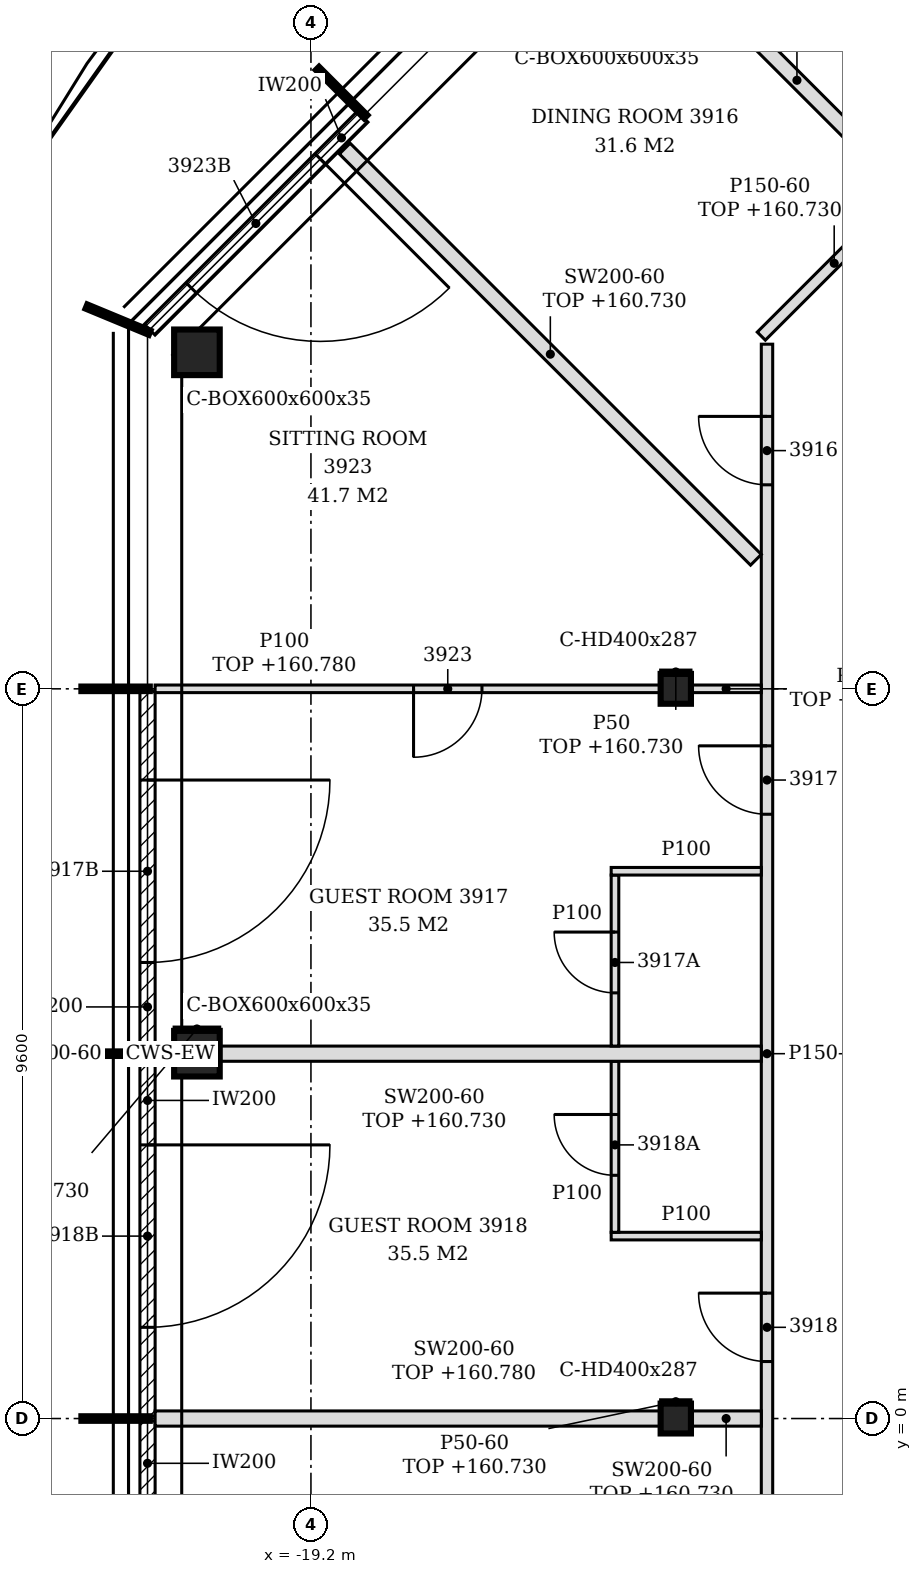
"""IFC4 building model, lengths in metres.
Left out: names, types, materials, properties, quantities, classifications, styles, units other than length and angle.
Written with IfcOpenShell. Run it as: python <this file> out.ifc"""

import sys

from ifc_helpers import new_model, si_unit, direction, frame, frame_2d, origin, origin_2d, place, context, subcontext, project, spatial, polyline, rectangle, hollow_rectangle, i_section, outline, extrude, element, fill, save


model = new_model("IFC4")
c1 = context("Model", 3, precision=1e-05, world=origin(), true_north=direction((0.0, 1.0)))
c2 = subcontext(c1, "Body", "Model", "MODEL_VIEW")
j1 = project(units=[si_unit("LENGTHUNIT", "METRE"), si_unit("PLANEANGLEUNIT", "RADIAN")], contexts=[c1])
p1 = place(None, origin())
s1 = spatial("IfcSite", under=j1, at=p1, CompositionType="ELEMENT")
p2 = place(p1, origin())
s2 = spatial("IfcBuilding", under=s1, at=p2, CompositionType="ELEMENT")
p3 = place(p2, frame((0.0, 0.0, 157.8)))
s3 = spatial("IfcBuildingStorey", under=s2, at=p3, CompositionType="ELEMENT", Elevation=157.8)
for number, where, z_axis, x_axis in (
    (1, (-20.7, 14.027, -0.15), (0.0, 0.0, 1.0), (1.0, 0.0, 0.0)),
    (2, (-20.7, 4.8, -0.15), (0.0, 0.0, 1.0), (1.0, 0.0, 0.0)),
):
    element("IfcColumn", number, at=place(p3, frame(where, z_axis=z_axis, x_axis=x_axis)), inside=s3, PredefinedType="COLUMN", context=c2, shape_type="SweptSolid", body=[
        extrude(hollow_rectangle(XDim=0.6, YDim=0.6, WallThickness=0.035, at=origin_2d()), origin(), (0.0, 0.0, 1.0), 3.6),
    ])
for number, where, z_axis, x_axis in (
    (3, (-14.4, 0.0, -0.15), (0.0, 0.0, 1.0), (1.0, 0.0, 0.0)),
    (4, (-14.4, 9.6, -0.15), (0.0, 0.0, 1.0), (1.0, 0.0, 0.0)),
):
    element("IfcColumn", number, at=place(p3, frame(where, z_axis=z_axis, x_axis=x_axis)), inside=s3, PredefinedType="COLUMN", context=c2, shape_type="SweptSolid", body=[
        extrude(i_section(OverallWidth=0.399, OverallDepth=0.393, WebThickness=0.023, FlangeThickness=0.037, FilletRadius=0.015, at=origin_2d()), origin(), (0.0, 0.0, 1.0), 3.6),
    ])
p4 = place(p3, frame((-18.521, 17.126, 0.0), z_axis=(0.0, 0.0, 1.0), x_axis=(-0.707106781187, -0.707106781187, 0.0)))
e5 = element("IfcWall", 5, at=p4, inside=s3, PredefinedType="NOTDEFINED", context=c2, shape_type="SweptSolid", body=[
    extrude(rectangle(XDim=3.962, YDim=0.2, at=frame_2d((1.981, 0.0))), origin(), (0.0, 0.0, 1.0), 3.45),
])
p5 = place(p4, frame((0.785, 0.0, 0.0)))
e6 = element("IfcOpeningElement", 6, at=p5, cuts=e5, PredefinedType="OPENING", context=c2, shape_type="SweptSolid", body=[
    extrude(rectangle(XDim=2.4, YDim=2.4, at=frame_2d((1.2, 1.2))), frame((0.0, 0.11, 0.0), z_axis=(0.0, -1.0, 0.0), x_axis=(1.0, 0.0, 0.0)), (0.0, 0.0, 1.0), 0.22),
])
p6 = place(p3, frame((-21.35, 9.57, 0.0), z_axis=(0.0, 0.0, 1.0), x_axis=(0.0, -1.0, 0.0)))
e7 = element("IfcWall", 7, at=p6, inside=s3, PredefinedType="NOTDEFINED", context=c2, shape_type="SweptSolid", body=[
    extrude(rectangle(XDim=4.74, YDim=0.2, at=frame_2d((2.37, 0.0))), origin(), (0.0, 0.0, 1.0), 3.45),
])
p7 = place(p6, frame((1.17, 0.0, 0.0)))
e8 = element("IfcOpeningElement", 8, at=p7, cuts=e7, PredefinedType="OPENING", context=c2, shape_type="SweptSolid", body=[
    extrude(rectangle(XDim=2.4, YDim=2.4, at=frame_2d((1.2, 1.2))), frame((0.0, 0.11, 0.0), z_axis=(0.0, -1.0, 0.0), x_axis=(1.0, 0.0, 0.0)), (0.0, 0.0, 1.0), 0.22),
])
p8 = place(p3, frame((-21.35, 4.77, 0.0), z_axis=(0.0, 0.0, 1.0), x_axis=(0.0, -1.0, 0.0)))
e9 = element("IfcWall", 9, at=p8, inside=s3, PredefinedType="NOTDEFINED", context=c2, shape_type="SweptSolid", body=[
    extrude(rectangle(XDim=4.74, YDim=0.2, at=frame_2d((2.37, 0.0))), origin(), (0.0, 0.0, 1.0), 3.45),
])
p9 = place(p8, frame((1.17, 0.0, 0.0)))
e10 = element("IfcOpeningElement", 10, at=p9, cuts=e9, PredefinedType="OPENING", context=c2, shape_type="SweptSolid", body=[
    extrude(rectangle(XDim=2.4, YDim=2.4, at=frame_2d((1.2, 1.2))), frame((0.0, 0.11, 0.0), z_axis=(0.0, -1.0, 0.0), x_axis=(1.0, 0.0, 0.0)), (0.0, 0.0, 1.0), 0.22),
])
p10 = place(p3, frame((-21.35, -0.03, 0.0), z_axis=(0.0, 0.0, 1.0), x_axis=(0.0, -1.0, 0.0)))
e11 = element("IfcWall", 11, at=p10, inside=s3, PredefinedType="NOTDEFINED", context=c2, shape_type="SweptSolid", body=[
    extrude(rectangle(XDim=4.626, YDim=0.2, at=frame_2d((2.313, 0.0))), origin(), (0.0, 0.0, 1.0), 3.45),
])
p11 = place(p10, frame((1.118, 0.0, 0.0)))
e12 = element("IfcOpeningElement", 12, at=p11, cuts=e11, PredefinedType="OPENING", context=c2, shape_type="SweptSolid", body=[
    extrude(rectangle(XDim=2.4, YDim=2.4, at=frame_2d((1.2, 1.2))), frame((0.0, 0.11, 0.0), z_axis=(0.0, -1.0, 0.0), x_axis=(1.0, 0.0, 0.0)), (0.0, 0.0, 1.0), 0.22),
])
p12 = place(p3, frame((-13.2, -3.5, 0.0), z_axis=(0.0, 0.0, 1.0), x_axis=(0.0, 1.0, 0.0)))
e13 = element("IfcWall", 13, at=p12, inside=s3, PredefinedType="PARTITIONING", context=c2, shape_type="SweptSolid", body=[
    extrude(outline(polyline([(0.0, 0.0), (17.634, 0.0), (17.634, 3.45), (13.2, 3.45), (13.198, 2.93), (13.0, 2.93), (12.998, 3.45), (8.4, 3.45), (8.398, 2.93), (8.2, 2.93), (8.198, 3.45), (3.6, 3.45), (3.598, 2.93), (3.4, 2.93), (3.398, 3.45), (0.0, 3.45), (0.0, 0.0)])), frame((0.0, 0.075, 0.0), z_axis=(0.0, -1.0, 0.0), x_axis=(1.0, 0.0, 0.0)), (0.0, 0.0, 1.0), 0.15),
])
p13 = place(p12, frame((15.784, 0.0, 0.0)))
e14 = element("IfcOpeningElement", 14, at=p13, cuts=e13, PredefinedType="OPENING", context=c2, shape_type="SweptSolid", body=[
    extrude(rectangle(XDim=0.9, YDim=2.1, at=frame_2d((0.45, 1.05))), frame((0.0, 0.085, 0.0), z_axis=(0.0, -1.0, 0.0), x_axis=(1.0, 0.0, 0.0)), (0.0, 0.0, 1.0), 0.17),
])
p14 = place(p12, frame((11.45, 0.0, 0.0)))
e15 = element("IfcOpeningElement", 15, at=p14, cuts=e13, PredefinedType="OPENING", context=c2, shape_type="SweptSolid", body=[
    extrude(rectangle(XDim=0.9, YDim=2.1, at=frame_2d((0.45, 1.05))), frame((0.0, 0.085, 0.0), z_axis=(0.0, -1.0, 0.0), x_axis=(1.0, 0.0, 0.0)), (0.0, 0.0, 1.0), 0.17),
])
p15 = place(p12, frame((4.25, 0.0, 0.0)))
e16 = element("IfcOpeningElement", 16, at=p15, cuts=e13, PredefinedType="OPENING", context=c2, shape_type="SweptSolid", body=[
    extrude(rectangle(XDim=0.9, YDim=2.1, at=frame_2d((0.45, 1.05))), frame((0.0, 0.085, 0.0), z_axis=(0.0, -1.0, 0.0), x_axis=(1.0, 0.0, 0.0)), (0.0, 0.0, 1.0), 0.17),
])
p16 = place(p12, frame((1.353, 0.0, 0.0)))
e17 = element("IfcOpeningElement", 17, at=p16, cuts=e13, PredefinedType="OPENING", context=c2, shape_type="SweptSolid", body=[
    extrude(rectangle(XDim=0.9, YDim=2.1, at=frame_2d((0.45, 1.05))), frame((0.0, 0.085, 0.0), z_axis=(0.0, -1.0, 0.0), x_axis=(1.0, 0.0, 0.0)), (0.0, 0.0, 1.0), 0.17),
])
p17 = place(p3, frame((-21.25, 0.0, 0.0), z_axis=(0.0, 0.0, 1.0), x_axis=(1.0, 0.0, 0.0)))
e18 = element("IfcWall", 18, at=p17, inside=s3, PredefinedType="PARTITIONING", context=c2, shape_type="SweptSolid", body=[
    extrude(outline(polyline([(0.0, 0.0), (6.65, 0.0), (6.65, 2.98), (0.7, 2.98), (0.698, 2.93), (0.4, 2.93), (0.398, 2.98), (0.0, 2.98), (0.0, 0.0)])), frame((0.0, 0.1, 0.0), z_axis=(0.0, -1.0, 0.0), x_axis=(1.0, 0.0, 0.0)), (0.0, 0.0, 1.0), 0.2),
])
p18 = place(p3, frame((-14.2, 0.0, 0.0), z_axis=(0.0, 0.0, 1.0), x_axis=(1.0, 0.0, 0.0)))
e19 = element("IfcWall", 19, at=p18, inside=s3, PredefinedType="PARTITIONING", context=c2, shape_type="SweptSolid", body=[
    extrude(rectangle(XDim=0.926, YDim=0.2, at=frame_2d((0.463, 0.0))), origin(), (0.0, 0.0, 1.0), 2.93),
])
p19 = place(p3, frame((-15.25, 2.4, 0.0), z_axis=(0.0, 0.0, 1.0), x_axis=(1.0, 0.0, 0.0)))
e20 = element("IfcWall", 20, at=p19, inside=s3, PredefinedType="PARTITIONING", context=c2, shape_type="SweptSolid", body=[
    extrude(outline(polyline([(0.0, 0.0), (1.975, 0.0), (1.975, 3.45), (1.0, 3.45), (0.998, 2.93), (0.7, 2.93), (0.698, 3.45), (0.0, 3.45), (0.0, 0.0)])), frame((0.0, 0.05, 0.0), z_axis=(0.0, -1.0, 0.0), x_axis=(1.0, 0.0, 0.0)), (0.0, 0.0, 1.0), 0.1),
])
p20 = place(p3, frame((-15.2, 2.45, 0.0), z_axis=(0.0, 0.0, 1.0), x_axis=(0.0, 1.0, 0.0)))
e21 = element("IfcWall", 21, at=p20, inside=s3, PredefinedType="PARTITIONING", context=c2, shape_type="SweptSolid", body=[
    extrude(rectangle(XDim=2.25, YDim=0.1, at=frame_2d((1.125, 0.0))), origin(), (0.0, 0.0, 1.0), 3.45),
])
p21 = place(p20, frame((0.75, 0.0, 0.0)))
e22 = element("IfcOpeningElement", 22, at=p21, cuts=e21, PredefinedType="OPENING", context=c2, shape_type="SweptSolid", body=[
    extrude(rectangle(XDim=0.8, YDim=2.1, at=frame_2d((0.4, 1.05))), frame((0.0, 0.06, 0.0), z_axis=(0.0, -1.0, 0.0), x_axis=(1.0, 0.0, 0.0)), (0.0, 0.0, 1.0), 0.12),
])
p22 = place(p3, frame((-21.25, 4.8, 0.0), z_axis=(0.0, 0.0, 1.0), x_axis=(1.0, 0.0, 0.0)))
e23 = element("IfcWall", 23, at=p22, inside=s3, PredefinedType="PARTITIONING", context=c2, shape_type="SweptSolid", body=[
    extrude(rectangle(XDim=0.25, YDim=0.2, at=frame_2d((0.125, 0.0))), origin(), (0.0, 0.0, 1.0), 3.45),
])
p23 = place(p3, frame((-20.4, 4.8, 0.0), z_axis=(0.0, 0.0, 1.0), x_axis=(1.0, 0.0, 0.0)))
e24 = element("IfcWall", 24, at=p23, inside=s3, PredefinedType="PARTITIONING", context=c2, shape_type="SweptSolid", body=[
    extrude(rectangle(XDim=7.125, YDim=0.2, at=frame_2d((3.562, 0.0))), origin(), (0.0, 0.0, 1.0), 2.93),
])
p24 = place(p3, frame((-15.2, 4.9, 0.0), z_axis=(0.0, 0.0, 1.0), x_axis=(0.0, 1.0, 0.0)))
e25 = element("IfcWall", 25, at=p24, inside=s3, PredefinedType="PARTITIONING", context=c2, shape_type="SweptSolid", body=[
    extrude(rectangle(XDim=2.25, YDim=0.1, at=frame_2d((1.125, 0.0))), origin(), (0.0, 0.0, 1.0), 3.45),
])
p25 = place(p24, frame((0.7, 0.0, 0.0)))
e26 = element("IfcOpeningElement", 26, at=p25, cuts=e25, PredefinedType="OPENING", context=c2, shape_type="SweptSolid", body=[
    extrude(rectangle(XDim=0.8, YDim=2.1, at=frame_2d((0.4, 1.05))), frame((0.0, 0.06, 0.0), z_axis=(0.0, -1.0, 0.0), x_axis=(1.0, 0.0, 0.0)), (0.0, 0.0, 1.0), 0.12),
])
p26 = place(p3, frame((-15.25, 7.2, 0.0), z_axis=(0.0, 0.0, 1.0), x_axis=(1.0, 0.0, 0.0)))
e27 = element("IfcWall", 27, at=p26, inside=s3, PredefinedType="PARTITIONING", context=c2, shape_type="SweptSolid", body=[
    extrude(outline(polyline([(0.0, 0.0), (1.975, 0.0), (1.975, 3.45), (1.0, 3.45), (0.998, 2.93), (0.7, 2.93), (0.698, 3.45), (0.0, 3.45), (0.0, 0.0)])), frame((0.0, 0.05, 0.0), z_axis=(0.0, -1.0, 0.0), x_axis=(1.0, 0.0, 0.0)), (0.0, 0.0, 1.0), 0.1),
])
p27 = place(p3, frame((-21.25, 9.6, 0.0), z_axis=(0.0, 0.0, 1.0), x_axis=(1.0, 0.0, 0.0)))
e28 = element("IfcWall", 28, at=p27, inside=s3, PredefinedType="PARTITIONING", context=c2, shape_type="SweptSolid", body=[
    extrude(outline(polyline([(0.0, 0.0), (6.65, 0.0), (6.65, 2.98), (0.7, 2.98), (0.698, 2.93), (0.4, 2.93), (0.398, 2.98), (0.0, 2.98), (0.0, 0.0)])), frame((0.0, 0.05, 0.0), z_axis=(0.0, -1.0, 0.0), x_axis=(1.0, 0.0, 0.0)), (0.0, 0.0, 1.0), 0.1),
])
p28 = place(p27, frame((3.4, 0.0, 0.0)))
e29 = element("IfcOpeningElement", 29, at=p28, cuts=e28, PredefinedType="OPENING", context=c2, shape_type="SweptSolid", body=[
    extrude(rectangle(XDim=0.9, YDim=2.1, at=frame_2d((0.45, 1.05))), frame((0.0, 0.06, 0.0), z_axis=(0.0, -1.0, 0.0), x_axis=(1.0, 0.0, 0.0)), (0.0, 0.0, 1.0), 0.12),
])
p29 = place(p3, frame((-14.2, 9.6, 0.0), z_axis=(0.0, 0.0, 1.0), x_axis=(1.0, 0.0, 0.0)))
e30 = element("IfcWall", 30, at=p29, inside=s3, PredefinedType="PARTITIONING", context=c2, shape_type="SweptSolid", body=[
    extrude(rectangle(XDim=0.926, YDim=0.1, at=frame_2d((0.463, 0.0))), origin(), (0.0, 0.0, 1.0), 2.93),
])
p30 = place(p3, frame((-13.346, 11.298, 0.0), z_axis=(0.0, 0.0, 1.0), x_axis=(-0.707106781187, 0.707106781187, 0.0)))
e31 = element("IfcWall", 31, at=p30, inside=s3, PredefinedType="PARTITIONING", context=c2, shape_type="SweptSolid", body=[
    extrude(rectangle(XDim=7.65, YDim=0.2, at=frame_2d((3.825, 0.0))), origin(), (0.0, 0.0, 1.0), 2.93),
])
p31 = place(p3, frame((-13.275, 14.24, 0.0), z_axis=(0.0, 0.0, 1.0), x_axis=(0.707286821097, 0.706926695424, 0.0)))
e32 = element("IfcWall", 32, at=p31, inside=s3, PredefinedType="PARTITIONING", context=c2, shape_type="SweptSolid", body=[
    extrude(rectangle(XDim=2.712, YDim=0.15, at=frame_2d((1.356, 0.0))), origin(), (0.0, 0.0, 1.0), 2.93),
])
p32 = place(p3, frame((-11.41, 16.21, 0.0), z_axis=(0.0, 0.0, 1.0), x_axis=(-0.707106781187, 0.707106781187, 0.0)))
e33 = element("IfcWall", 33, at=p32, inside=s3, PredefinedType="PARTITIONING", context=c2, shape_type="SweptSolid", body=[
    extrude(rectangle(XDim=3.948, YDim=0.2, at=frame_2d((1.974, 0.0))), origin(), (0.0, 0.0, 1.0), 2.93),
])
p33 = place(p3, frame((-14.6, 0.221, 0.0), z_axis=(0.0, 0.0, 1.0), x_axis=(1.0, 0.0, 0.0)))
e34 = element("IfcWall", 34, at=p33, inside=s3, PredefinedType="PARTITIONING", context=c2, shape_type="SweptSolid", body=[
    extrude(rectangle(XDim=0.399, YDim=0.05, at=frame_2d((0.2, 0.0))), origin(), (0.0, 0.0, 1.0), 2.93),
])
p34 = place(p3, frame((-21.0, 5.125, 0.0), z_axis=(0.0, 0.0, 1.0), x_axis=(1.0, 0.0, 0.0)))
e35 = element("IfcWall", 35, at=p34, inside=s3, PredefinedType="PARTITIONING", context=c2, shape_type="SweptSolid", body=[
    extrude(rectangle(XDim=0.6, YDim=0.05, at=frame_2d((0.3, 0.0))), origin(), (0.0, 0.0, 1.0), 2.93),
])
p35 = place(p3, frame((-14.6, 9.822, 0.0), z_axis=(0.0, 0.0, 1.0), x_axis=(1.0, 0.0, 0.0)))
e36 = element("IfcWall", 36, at=p35, inside=s3, PredefinedType="PARTITIONING", context=c2, shape_type="SweptSolid", body=[
    extrude(rectangle(XDim=0.399, YDim=0.05, at=frame_2d((0.2, 0.0))), origin(), (0.0, 0.0, 1.0), 2.93),
])
p36 = place(p5, origin())
e37 = element("IfcDoor", 37, at=p36, inside=s3, OperationType="SINGLE_SWING_LEFT", PredefinedType="DOOR", context=c2, shape_type="SweptSolid", body=[
    extrude(rectangle(XDim=2.4, YDim=2.4, at=frame_2d((1.2, 1.2))), frame((0.0, 0.025, 0.0), z_axis=(0.0, -1.0, 0.0), x_axis=(1.0, 0.0, 0.0)), (0.0, 0.0, 1.0), 0.05),
])
fill(e6, e37)
p37 = place(p7, origin())
e38 = element("IfcDoor", 38, at=p37, inside=s3, OperationType="SINGLE_SWING_LEFT", PredefinedType="DOOR", context=c2, shape_type="SweptSolid", body=[
    extrude(rectangle(XDim=2.4, YDim=2.4, at=frame_2d((1.2, 1.2))), frame((0.0, 0.025, 0.0), z_axis=(0.0, -1.0, 0.0), x_axis=(1.0, 0.0, 0.0)), (0.0, 0.0, 1.0), 0.05),
])
fill(e8, e38)
p38 = place(p9, origin())
e39 = element("IfcDoor", 39, at=p38, inside=s3, OperationType="SINGLE_SWING_LEFT", PredefinedType="DOOR", context=c2, shape_type="SweptSolid", body=[
    extrude(rectangle(XDim=2.4, YDim=2.4, at=frame_2d((1.2, 1.2))), frame((0.0, 0.025, 0.0), z_axis=(0.0, -1.0, 0.0), x_axis=(1.0, 0.0, 0.0)), (0.0, 0.0, 1.0), 0.05),
])
fill(e10, e39)
p39 = place(p13, origin())
e40 = element("IfcDoor", 40, at=p39, inside=s3, OperationType="SINGLE_SWING_RIGHT", PredefinedType="DOOR", context=c2, shape_type="SweptSolid", body=[
    extrude(rectangle(XDim=0.9, YDim=2.1, at=frame_2d((0.45, 1.05))), frame((0.0, 0.025, 0.0), z_axis=(0.0, -1.0, 0.0), x_axis=(1.0, 0.0, 0.0)), (0.0, 0.0, 1.0), 0.05),
])
fill(e14, e40)
p40 = place(p14, origin())
e41 = element("IfcDoor", 41, at=p40, inside=s3, OperationType="SINGLE_SWING_RIGHT", PredefinedType="DOOR", context=c2, shape_type="SweptSolid", body=[
    extrude(rectangle(XDim=0.9, YDim=2.1, at=frame_2d((0.45, 1.05))), frame((0.0, 0.025, 0.0), z_axis=(0.0, -1.0, 0.0), x_axis=(1.0, 0.0, 0.0)), (0.0, 0.0, 1.0), 0.05),
])
fill(e15, e41)
p41 = place(p25, origin())
e42 = element("IfcDoor", 42, at=p41, inside=s3, OperationType="SINGLE_SWING_RIGHT", PredefinedType="DOOR", context=c2, shape_type="SweptSolid", body=[
    extrude(rectangle(XDim=0.8, YDim=2.1, at=frame_2d((0.4, 1.05))), frame((0.0, 0.025, 0.0), z_axis=(0.0, -1.0, 0.0), x_axis=(1.0, 0.0, 0.0)), (0.0, 0.0, 1.0), 0.05),
])
fill(e26, e42)
p42 = place(p15, origin())
e43 = element("IfcDoor", 43, at=p42, inside=s3, OperationType="SINGLE_SWING_RIGHT", PredefinedType="DOOR", context=c2, shape_type="SweptSolid", body=[
    extrude(rectangle(XDim=0.9, YDim=2.1, at=frame_2d((0.45, 1.05))), frame((0.0, 0.025, 0.0), z_axis=(0.0, -1.0, 0.0), x_axis=(1.0, 0.0, 0.0)), (0.0, 0.0, 1.0), 0.05),
])
fill(e16, e43)
p43 = place(p21, origin())
e44 = element("IfcDoor", 44, at=p43, inside=s3, OperationType="SINGLE_SWING_RIGHT", PredefinedType="DOOR", context=c2, shape_type="SweptSolid", body=[
    extrude(rectangle(XDim=0.8, YDim=2.1, at=frame_2d((0.4, 1.05))), frame((0.0, 0.025, 0.0), z_axis=(0.0, -1.0, 0.0), x_axis=(1.0, 0.0, 0.0)), (0.0, 0.0, 1.0), 0.05),
])
fill(e22, e44)
p44 = place(p28, frame((0.9, 0.0, 0.0), z_axis=(0.0, 0.0, 1.0), x_axis=(-1.0, 0.0, 0.0)))
e45 = element("IfcDoor", 45, at=p44, inside=s3, OperationType="SINGLE_SWING_RIGHT", PredefinedType="DOOR", context=c2, shape_type="SweptSolid", body=[
    extrude(rectangle(XDim=0.9, YDim=2.1, at=frame_2d((0.45, 1.05))), frame((0.0, 0.025, 0.0), z_axis=(0.0, -1.0, 0.0), x_axis=(1.0, 0.0, 0.0)), (0.0, 0.0, 1.0), 0.05),
])
fill(e29, e45)
save(model, sys.argv[1])
